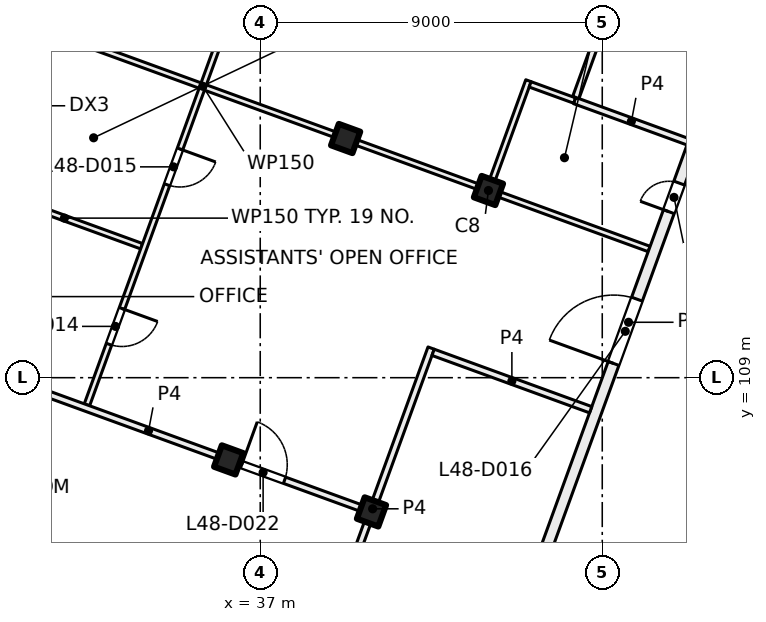
"""IFC4 building model, lengths in metres.
Left out: names, types, materials, properties, quantities, classifications, styles, units other than length and angle.
Written with IfcOpenShell. Run it as: python <this file> out.ifc"""

import sys

from ifc_helpers import new_model, si_unit, direction, frame, frame_2d, origin, origin_2d, place, context, subcontext, project, spatial, rectangle, extrude, element, fill, save


model = new_model("IFC4")
c1 = context("Model", 3, precision=1e-05, world=origin(), true_north=direction((0.0, 1.0)))
c2 = subcontext(c1, "Body", "Model", "MODEL_VIEW")
j1 = project(units=[si_unit("LENGTHUNIT", "METRE"), si_unit("PLANEANGLEUNIT", "RADIAN")], contexts=[c1])
p1 = place(None, origin())
s1 = spatial("IfcSite", under=j1, at=p1, CompositionType="ELEMENT")
p2 = place(p1, origin())
s2 = spatial("IfcBuilding", under=s1, at=p2, CompositionType="ELEMENT")
p3 = place(p2, frame((0.0, 0.0, 204.0)))
s3 = spatial("IfcBuildingStorey", under=s2, at=p3, CompositionType="ELEMENT", Elevation=204.0)
for number, where, z_axis, x_axis in (
    (1, (43.006, 113.925, 0.0), (0.0, 0.0, 1.0), (-0.342, -0.94, 0.0)),
    (2, (39.927, 105.468, 0.0), (0.0, 0.0, 1.0), (-0.342, -0.94, 0.0)),
    (3, (39.247, 115.293, 0.0), (0.0, 0.0, 1.0), (-0.342, -0.94, 0.0)),
    (4, (36.169, 106.836, 0.0), (0.0, 0.0, 1.0), (-0.342, -0.94, 0.0)),
):
    element("IfcColumn", number, at=place(p3, frame(where, z_axis=z_axis, x_axis=x_axis)), inside=s3, PredefinedType="COLUMN", context=c2, shape_type="SweptSolid", body=[
        extrude(rectangle(XDim=0.6, YDim=0.6, at=origin_2d()), origin(), (0.0, 0.0, 1.0), 4.0),
    ])
p4 = place(p3, frame((52.212, 113.783, 0.0), z_axis=(0.0, 0.0, 1.0), x_axis=(-0.34202521188, -0.939690775968, 0.0)))
e5 = element("IfcWall", 5, at=p4, inside=s3, PredefinedType="SOLIDWALL", context=c2, shape_type="SweptSolid", body=[
    extrude(rectangle(XDim=21.745, YDim=0.6, at=frame_2d((10.873, 0.0))), origin(), (0.0, 0.0, 1.0), 3.625),
])
p5 = place(p4, frame((3.765, 0.0, 0.9)))
e6 = element("IfcOpeningElement", 6, at=p5, cuts=e5, PredefinedType="OPENING", context=c2, shape_type="SweptSolid", body=[
    extrude(rectangle(XDim=3.0, YDim=2.4, at=frame_2d((1.5, 1.2))), frame((0.0, 0.31, 0.0), z_axis=(0.0, -1.0, 0.0), x_axis=(1.0, 0.0, 0.0)), (0.0, 0.0, 1.0), 0.62),
])
p6 = place(p4, frame((8.265, 0.0, 0.9)))
e7 = element("IfcOpeningElement", 7, at=p6, cuts=e5, PredefinedType="OPENING", context=c2, shape_type="SweptSolid", body=[
    extrude(rectangle(XDim=3.0, YDim=2.4, at=frame_2d((1.5, 1.2))), frame((0.0, 0.31, 0.0), z_axis=(0.0, -1.0, 0.0), x_axis=(1.0, 0.0, 0.0)), (0.0, 0.0, 1.0), 0.62),
])
p7 = place(p4, frame((12.765, 0.0, 0.9)))
e8 = element("IfcOpeningElement", 8, at=p7, cuts=e5, PredefinedType="OPENING", context=c2, shape_type="SweptSolid", body=[
    extrude(rectangle(XDim=3.0, YDim=2.4, at=frame_2d((1.5, 1.2))), frame((0.0, 0.31, 0.0), z_axis=(0.0, -1.0, 0.0), x_axis=(1.0, 0.0, 0.0)), (0.0, 0.0, 1.0), 0.62),
])
p8 = place(p4, frame((17.265, 0.0, 0.9)))
e9 = element("IfcOpeningElement", 9, at=p8, cuts=e5, PredefinedType="OPENING", context=c2, shape_type="SweptSolid", body=[
    extrude(rectangle(XDim=3.0, YDim=2.4, at=frame_2d((1.5, 1.2))), frame((0.0, 0.31, 0.0), z_axis=(0.0, -1.0, 0.0), x_axis=(1.0, 0.0, 0.0)), (0.0, 0.0, 1.0), 0.62),
])
p9 = place(p3, frame((24.666, 100.669, 0.0), z_axis=(0.0, 0.0, 1.0), x_axis=(0.34201964167, 0.939692803373, 0.0)))
e10 = element("IfcWall", 10, at=p9, inside=s3, PredefinedType="SOLIDWALL", context=c2, shape_type="SweptSolid", body=[
    extrude(rectangle(XDim=32.884, YDim=0.6, at=frame_2d((16.442, 0.0))), origin(), (0.0, 0.0, 1.0), 3.625),
])
p10 = place(p9, frame((1.48, 0.0, 0.9)))
e11 = element("IfcOpeningElement", 11, at=p10, cuts=e10, PredefinedType="OPENING", context=c2, shape_type="SweptSolid", body=[
    extrude(rectangle(XDim=3.0, YDim=2.4, at=frame_2d((1.5, 1.2))), frame((0.0, 0.31, 0.0), z_axis=(0.0, -1.0, 0.0), x_axis=(1.0, 0.0, 0.0)), (0.0, 0.0, 1.0), 0.62),
])
p11 = place(p9, frame((5.98, 0.0, 0.9)))
e12 = element("IfcOpeningElement", 12, at=p11, cuts=e10, PredefinedType="OPENING", context=c2, shape_type="SweptSolid", body=[
    extrude(rectangle(XDim=3.0, YDim=2.4, at=frame_2d((1.5, 1.2))), frame((0.0, 0.31, 0.0), z_axis=(0.0, -1.0, 0.0), x_axis=(1.0, 0.0, 0.0)), (0.0, 0.0, 1.0), 0.62),
])
p12 = place(p9, frame((10.48, 0.0, 0.9)))
e13 = element("IfcOpeningElement", 13, at=p12, cuts=e10, PredefinedType="OPENING", context=c2, shape_type="SweptSolid", body=[
    extrude(rectangle(XDim=3.0, YDim=2.4, at=frame_2d((1.5, 1.2))), frame((0.0, 0.31, 0.0), z_axis=(0.0, -1.0, 0.0), x_axis=(1.0, 0.0, 0.0)), (0.0, 0.0, 1.0), 0.62),
])
p13 = place(p9, frame((15.58, 0.0, 0.0)))
e14 = element("IfcOpeningElement", 14, at=p13, cuts=e10, PredefinedType="OPENING", context=c2, shape_type="SweptSolid", body=[
    extrude(rectangle(XDim=1.8, YDim=2.4, at=frame_2d((0.9, 1.2))), frame((0.0, 0.31, 0.0), z_axis=(0.0, -1.0, 0.0), x_axis=(1.0, 0.0, 0.0)), (0.0, 0.0, 1.0), 0.62),
])
p14 = place(p9, frame((19.48, 0.0, 0.9)))
e15 = element("IfcOpeningElement", 15, at=p14, cuts=e10, PredefinedType="OPENING", context=c2, shape_type="SweptSolid", body=[
    extrude(rectangle(XDim=3.0, YDim=2.4, at=frame_2d((1.5, 1.2))), frame((0.0, 0.31, 0.0), z_axis=(0.0, -1.0, 0.0), x_axis=(1.0, 0.0, 0.0)), (0.0, 0.0, 1.0), 0.62),
])
p15 = place(p9, frame((23.98, 0.0, 0.9)))
e16 = element("IfcOpeningElement", 16, at=p15, cuts=e10, PredefinedType="OPENING", context=c2, shape_type="SweptSolid", body=[
    extrude(rectangle(XDim=3.0, YDim=2.4, at=frame_2d((1.5, 1.2))), frame((0.0, 0.31, 0.0), z_axis=(0.0, -1.0, 0.0), x_axis=(1.0, 0.0, 0.0)), (0.0, 0.0, 1.0), 0.62),
])
p16 = place(p9, frame((29.08, 0.0, 0.0)))
e17 = element("IfcOpeningElement", 17, at=p16, cuts=e10, PredefinedType="OPENING", context=c2, shape_type="SweptSolid", body=[
    extrude(rectangle(XDim=1.8, YDim=2.4, at=frame_2d((0.9, 1.2))), frame((0.0, 0.31, 0.0), z_axis=(0.0, -1.0, 0.0), x_axis=(1.0, 0.0, 0.0)), (0.0, 0.0, 1.0), 0.62),
])
p17 = place(p3, frame((26.736, 105.48, 0.0), z_axis=(0.0, 0.0, 1.0), x_axis=(0.939695108427, -0.342013308511, 0.0)))
e18 = element("IfcWall", 18, at=p17, inside=s3, PredefinedType="PARTITIONING", context=c2, shape_type="SweptSolid", body=[
    extrude(rectangle(XDim=16.9, YDim=0.175, at=frame_2d((8.45, 0.0))), origin(), (0.0, 0.0, 1.0), 3.625),
])
p18 = place(p3, frame((29.814, 113.938, 0.0), z_axis=(0.0, 0.0, 1.0), x_axis=(0.93973078783, -0.341915262023, 0.0)))
e19 = element("IfcWall", 19, at=p18, inside=s3, PredefinedType="PARTITIONING", context=c2, shape_type="SweptSolid", body=[
    extrude(rectangle(XDim=4.326, YDim=0.15, at=frame_2d((2.163, 0.0))), origin(), (0.0, 0.0, 1.0), 3.625),
])
p19 = place(p3, frame((31.353, 118.166, 0.0), z_axis=(0.0, 0.0, 1.0), x_axis=(0.939695108427, -0.342013308511, 0.0)))
e20 = element("IfcWall", 20, at=p19, inside=s3, PredefinedType="PARTITIONING", context=c2, shape_type="SweptSolid", body=[
    extrude(rectangle(XDim=16.9, YDim=0.15, at=frame_2d((8.45, 0.0))), origin(), (0.0, 0.0, 1.0), 3.625),
])
p20 = place(p3, frame((38.54, 125.049, 0.0), z_axis=(0.0, 0.0, 1.0), x_axis=(-0.341960632782, -0.939714278719, 0.0)))
e21 = element("IfcWall", 21, at=p20, inside=s3, PredefinedType="PARTITIONING", context=c2, shape_type="SweptSolid", body=[
    extrude(rectangle(XDim=17.839, YDim=0.15, at=frame_2d((8.919, 0.0))), origin(), (0.0, 0.0, 1.0), 3.625),
])
p21 = place(p20, frame((15.142, 0.0, 0.0)))
e22 = element("IfcOpeningElement", 22, at=p21, cuts=e21, PredefinedType="OPENING", context=c2, shape_type="SweptSolid", body=[
    extrude(rectangle(XDim=1.0, YDim=2.1, at=frame_2d((0.5, 1.05))), frame((0.0, 0.085, 0.0), z_axis=(0.0, -1.0, 0.0), x_axis=(1.0, 0.0, 0.0)), (0.0, 0.0, 1.0), 0.17),
])
p22 = place(p20, frame((10.675, 0.0, 0.0)))
e23 = element("IfcOpeningElement", 23, at=p22, cuts=e21, PredefinedType="OPENING", context=c2, shape_type="SweptSolid", body=[
    extrude(rectangle(XDim=1.0, YDim=2.1, at=frame_2d((0.5, 1.05))), frame((0.0, 0.085, 0.0), z_axis=(0.0, -1.0, 0.0), x_axis=(1.0, 0.0, 0.0)), (0.0, 0.0, 1.0), 0.17),
])
p23 = place(p20, frame((6.176, 0.0, 0.0)))
e24 = element("IfcOpeningElement", 24, at=p23, cuts=e21, PredefinedType="OPENING", context=c2, shape_type="SweptSolid", body=[
    extrude(rectangle(XDim=1.0, YDim=2.1, at=frame_2d((0.5, 1.05))), frame((0.0, 0.085, 0.0), z_axis=(0.0, -1.0, 0.0), x_axis=(1.0, 0.0, 0.0)), (0.0, 0.0, 1.0), 0.17),
])
p24 = place(p20, frame((1.703, 0.0, 0.0)))
e25 = element("IfcOpeningElement", 25, at=p24, cuts=e21, PredefinedType="OPENING", context=c2, shape_type="SweptSolid", body=[
    extrude(rectangle(XDim=1.0, YDim=2.1, at=frame_2d((0.5, 1.05))), frame((0.0, 0.085, 0.0), z_axis=(0.0, -1.0, 0.0), x_axis=(1.0, 0.0, 0.0)), (0.0, 0.0, 1.0), 0.17),
])
p25 = place(p3, frame((38.418, 101.321, 0.0), z_axis=(0.0, 0.0, 1.0), x_axis=(0.342082778631, 0.939669821035, 0.0)))
e26 = element("IfcWall", 26, at=p25, inside=s3, PredefinedType="PARTITIONING", context=c2, shape_type="SweptSolid", body=[
    extrude(rectangle(XDim=9.001, YDim=0.175, at=frame_2d((4.5, 0.0))), origin(), (0.0, 0.0, 1.0), 3.625),
])
p26 = place(p3, frame((28.275, 109.709, 0.0), z_axis=(0.0, 0.0, 1.0), x_axis=(0.939707717516, -0.341978662553, 0.0)))
e27 = element("IfcWall", 27, at=p26, inside=s3, PredefinedType="PARTITIONING", context=c2, shape_type="SweptSolid", body=[
    extrude(rectangle(XDim=12.313, YDim=0.175, at=frame_2d((6.157, 0.0))), origin(), (0.0, 0.0, 1.0), 3.625),
])
p27 = place(p26, frame((8.765, 0.0, 0.0)))
e28 = element("IfcOpeningElement", 28, at=p27, cuts=e27, PredefinedType="OPENING", context=c2, shape_type="SweptSolid", body=[
    extrude(rectangle(XDim=1.2, YDim=2.1, at=frame_2d((0.6, 1.05))), frame((0.0, 0.097, 0.0), z_axis=(0.0, -1.0, 0.0), x_axis=(1.0, 0.0, 0.0)), (0.0, 0.0, 1.0), 0.195),
])
p28 = place(p3, frame((42.728, 99.567, 0.0), z_axis=(0.0, 0.0, 1.0), x_axis=(0.342016197204, 0.939694057048, 0.0)))
e29 = element("IfcWall", 29, at=p28, inside=s3, PredefinedType="PARTITIONING", context=c2, shape_type="SweptSolid", body=[
    extrude(rectangle(XDim=23.18, YDim=0.3, at=frame_2d((11.59, 0.0))), origin(), (0.0, 0.0, 1.0), 3.625),
])
p29 = place(p28, frame((3.987, 0.0, 0.0)))
e30 = element("IfcOpeningElement", 30, at=p29, cuts=e29, PredefinedType="OPENING", context=c2, shape_type="SweptSolid", body=[
    extrude(rectangle(XDim=1.2, YDim=2.1, at=frame_2d((0.6, 1.05))), frame((0.0, 0.16, 0.0), z_axis=(0.0, -1.0, 0.0), x_axis=(1.0, 0.0, 0.0)), (0.0, 0.0, 1.0), 0.32),
])
p30 = place(p28, frame((10.437, 0.0, 0.0)))
e31 = element("IfcOpeningElement", 31, at=p30, cuts=e29, PredefinedType="OPENING", context=c2, shape_type="SweptSolid", body=[
    extrude(rectangle(XDim=1.8, YDim=2.1, at=frame_2d((0.9, 1.05))), frame((0.0, 0.16, 0.0), z_axis=(0.0, -1.0, 0.0), x_axis=(1.0, 0.0, 0.0)), (0.0, 0.0, 1.0), 0.32),
])
p31 = place(p28, frame((14.687, 0.0, 0.0)))
e32 = element("IfcOpeningElement", 32, at=p31, cuts=e29, PredefinedType="OPENING", context=c2, shape_type="SweptSolid", body=[
    extrude(rectangle(XDim=0.8, YDim=2.1, at=frame_2d((0.4, 1.05))), frame((0.0, 0.16, 0.0), z_axis=(0.0, -1.0, 0.0), x_axis=(1.0, 0.0, 0.0)), (0.0, 0.0, 1.0), 0.32),
])
p32 = place(p3, frame((44.058, 116.814, 0.0), z_axis=(0.0, 0.0, 1.0), x_axis=(-0.342063238742, -0.939676934218, 0.0)))
e33 = element("IfcWall", 33, at=p32, inside=s3, PredefinedType="PARTITIONING", context=c2, shape_type="SweptSolid", body=[
    extrude(rectangle(XDim=3.0, YDim=0.15, at=frame_2d((1.5, 0.0))), origin(), (0.0, 0.0, 1.0), 3.625),
])
p33 = place(p3, frame((45.275, 116.292, 0.0), z_axis=(0.0, 0.0, 1.0), x_axis=(-0.93991332754, 0.341413146661, 0.0)))
e34 = element("IfcWall", 34, at=p33, inside=s3, PredefinedType="PARTITIONING", context=c2, shape_type="SweptSolid", body=[
    extrude(rectangle(XDim=1.248, YDim=0.15, at=frame_2d((0.624, 0.0))), origin(), (0.0, 0.0, 1.0), 3.625),
])
p34 = place(p3, frame((45.275, 116.292, 0.0), z_axis=(0.0, 0.0, 1.0), x_axis=(0.939649736865, -0.342137942956, 0.0)))
e35 = element("IfcWall", 35, at=p34, inside=s3, PredefinedType="PARTITIONING", context=c2, shape_type="SweptSolid", body=[
    extrude(rectangle(XDim=3.177, YDim=0.175, at=frame_2d((1.588, 0.0))), origin(), (0.0, 0.0, 1.0), 3.625),
])
p35 = place(p3, frame((45.695, 108.157, 0.0), z_axis=(0.0, 0.0, 1.0), x_axis=(-0.939620446327, 0.342218375959, 0.0)))
e36 = element("IfcWall", 36, at=p35, inside=s3, PredefinedType="PARTITIONING", context=c2, shape_type="SweptSolid", body=[
    extrude(rectangle(XDim=4.412, YDim=0.175, at=frame_2d((2.206, 0.0))), origin(), (0.0, 0.0, 1.0), 3.625),
])
p36 = place(p3, frame((45.305, 116.374, 0.0), z_axis=(0.0, 0.0, 1.0), x_axis=(0.341998803079, 0.939700387726, 0.0)))
e37 = element("IfcWall", 37, at=p36, inside=s3, PredefinedType="PARTITIONING", context=c2, shape_type="SweptSolid", body=[
    extrude(rectangle(XDim=5.825, YDim=0.175, at=frame_2d((2.913, 0.0))), origin(), (0.0, 0.0, 1.0), 3.625),
])
p37 = place(p36, frame((3.312, 0.0, 0.0)))
e38 = element("IfcOpeningElement", 38, at=p37, cuts=e37, PredefinedType="OPENING", context=c2, shape_type="SweptSolid", body=[
    extrude(rectangle(XDim=1.2, YDim=2.1, at=frame_2d((0.6, 1.05))), frame((0.0, 0.097, 0.0), z_axis=(0.0, -1.0, 0.0), x_axis=(1.0, 0.0, 0.0)), (0.0, 0.0, 1.0), 0.195),
])
p38 = place(p21, origin())
e39 = element("IfcDoor", 39, at=p38, inside=s3, OperationType="SINGLE_SWING_LEFT", PredefinedType="DOOR", context=c2, shape_type="SweptSolid", body=[
    extrude(rectangle(XDim=1.0, YDim=2.1, at=frame_2d((0.5, 1.05))), frame((0.0, 0.025, 0.0), z_axis=(0.0, -1.0, 0.0), x_axis=(1.0, 0.0, 0.0)), (0.0, 0.0, 1.0), 0.05),
])
fill(e22, e39)
p39 = place(p22, origin())
e40 = element("IfcDoor", 40, at=p39, inside=s3, OperationType="SINGLE_SWING_LEFT", PredefinedType="DOOR", context=c2, shape_type="SweptSolid", body=[
    extrude(rectangle(XDim=1.0, YDim=2.1, at=frame_2d((0.5, 1.05))), frame((0.0, 0.025, 0.0), z_axis=(0.0, -1.0, 0.0), x_axis=(1.0, 0.0, 0.0)), (0.0, 0.0, 1.0), 0.05),
])
fill(e23, e40)
p40 = place(p30, origin())
e41 = element("IfcDoor", 41, at=p40, inside=s3, OperationType="DOUBLE_DOOR_SINGLE_SWING", PredefinedType="DOOR", context=c2, shape_type="SweptSolid", body=[
    extrude(rectangle(XDim=1.8, YDim=2.1, at=frame_2d((0.9, 1.05))), frame((0.0, 0.025, 0.0), z_axis=(0.0, -1.0, 0.0), x_axis=(1.0, 0.0, 0.0)), (0.0, 0.0, 1.0), 0.05),
])
fill(e31, e41)
p41 = place(p31, origin())
e42 = element("IfcDoor", 42, at=p41, inside=s3, OperationType="SINGLE_SWING_LEFT", PredefinedType="DOOR", context=c2, shape_type="SweptSolid", body=[
    extrude(rectangle(XDim=0.8, YDim=2.1, at=frame_2d((0.4, 1.05))), frame((0.0, 0.025, 0.0), z_axis=(0.0, -1.0, 0.0), x_axis=(1.0, 0.0, 0.0)), (0.0, 0.0, 1.0), 0.05),
])
fill(e32, e42)
p42 = place(p27, origin())
e43 = element("IfcDoor", 43, at=p42, inside=s3, OperationType="DOUBLE_DOOR_SINGLE_SWING", PredefinedType="DOOR", context=c2, shape_type="SweptSolid", body=[
    extrude(rectangle(XDim=1.2, YDim=2.1, at=frame_2d((0.6, 1.05))), frame((0.0, 0.025, 0.0), z_axis=(0.0, -1.0, 0.0), x_axis=(1.0, 0.0, 0.0)), (0.0, 0.0, 1.0), 0.05),
])
fill(e28, e43)
save(model, sys.argv[1])
